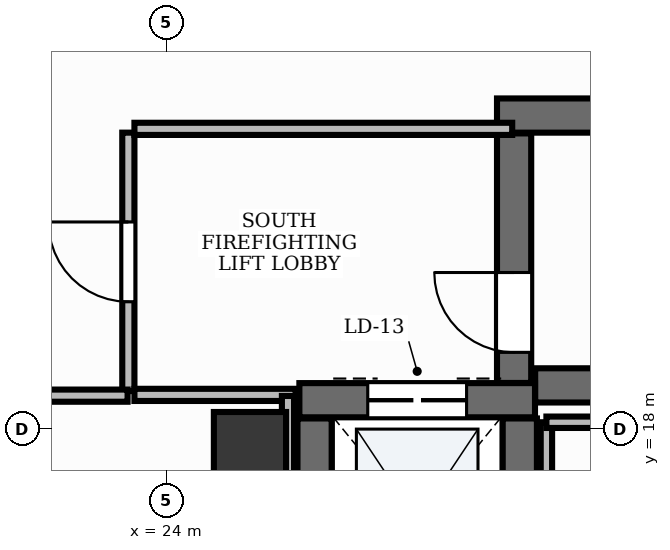
"""IFC4 building model, lengths in metres.
Left out: names, types, materials, properties, quantities, classifications, styles, units other than length and angle.
Written with IfcOpenShell. Run it as: python <this file> out.ifc"""

import sys

from ifc_helpers import new_model, si_unit, direction, frame, frame_2d, origin, origin_2d, place, context, subcontext, project, spatial, rectangle, extrude, element, fill, save


model = new_model("IFC4")
c1 = context("Model", 3, precision=1e-05, world=origin(), true_north=direction((0.0, 1.0)))
c2 = subcontext(c1, "Body", "Model", "MODEL_VIEW")
j1 = project(units=[si_unit("LENGTHUNIT", "METRE"), si_unit("PLANEANGLEUNIT", "RADIAN")], contexts=[c1])
p1 = place(None, origin())
s1 = spatial("IfcSite", under=j1, at=p1, CompositionType="ELEMENT")
p2 = place(p1, origin())
s2 = spatial("IfcBuilding", under=s1, at=p2, CompositionType="ELEMENT")
p3 = place(p2, frame((0.0, 0.0, 67.8)))
s3 = spatial("IfcBuildingStorey", under=s2, at=p3, CompositionType="ELEMENT", Elevation=67.8)
p4 = place(p3, frame((28.852, 18.575, 0.0), z_axis=(0.0, 0.0, 1.0), x_axis=(1.0, 0.0, 0.0)))
e1 = element("IfcWall", 1, at=p4, inside=s3, PredefinedType="SHEAR", context=c2, shape_type="SweptSolid", body=[
    extrude(rectangle(XDim=8.248, YDim=0.45, at=frame_2d((4.124, 0.0))), origin(), (0.0, 0.0, 1.0), 3.9),
])
p5 = place(p3, frame((28.35, 22.125, 0.0), z_axis=(0.0, 0.0, 1.0), x_axis=(1.0, 0.0, 0.0)))
e2 = element("IfcWall", 2, at=p5, inside=s3, PredefinedType="SHEAR", context=c2, shape_type="SweptSolid", body=[
    extrude(rectangle(XDim=8.75, YDim=0.45, at=frame_2d((4.375, 0.0))), origin(), (0.0, 0.0, 1.0), 3.9),
])
p6 = place(p3, frame((28.575, 18.607, 0.0), z_axis=(0.0, 0.0, 1.0), x_axis=(0.0, 1.0, 0.0)))
e3 = element("IfcWall", 3, at=p6, inside=s3, PredefinedType="SHEAR", context=c2, shape_type="SweptSolid", body=[
    extrude(rectangle(XDim=3.283, YDim=0.45, at=frame_2d((1.642, 0.0))), origin(), (0.0, 0.0, 1.0), 3.9),
])
p7 = place(p6, frame((0.403, 0.0, 0.0)))
e4 = element("IfcOpeningElement", 4, at=p7, cuts=e3, PredefinedType="OPENING", context=c2, shape_type="SweptSolid", body=[
    extrude(rectangle(XDim=1.05, YDim=2.15, at=frame_2d((0.525, 1.075))), frame((0.0, 0.24, 0.0), z_axis=(0.0, -1.0, 0.0), x_axis=(1.0, 0.0, 0.0)), (0.0, 0.0, 1.0), 0.48),
])
p8 = place(p3, frame((25.75, 18.38, 0.0), z_axis=(0.0, 0.0, 1.0), x_axis=(1.0, 0.0, 0.0)))
e5 = element("IfcWall", 5, at=p8, inside=s3, PredefinedType="SHEAR", context=c2, shape_type="SweptSolid", body=[
    extrude(rectangle(XDim=3.1, YDim=0.45, at=frame_2d((1.55, 0.0))), origin(), (0.0, 0.0, 1.0), 3.9),
])
p9 = place(p8, frame((0.9, 0.0, 0.0)))
e6 = element("IfcOpeningElement", 6, at=p9, cuts=e5, PredefinedType="OPENING", context=c2, shape_type="SweptSolid", body=[
    extrude(rectangle(XDim=1.3, YDim=2.2, at=frame_2d((0.65, 1.1))), frame((0.0, 0.24, 0.0), z_axis=(0.0, -1.0, 0.0), x_axis=(1.0, 0.0, 0.0)), (0.0, 0.0, 1.0), 0.48),
])
for number, where, z_axis, x_axis in (
    (7, (25.95, 15.44, 0.0), (0.0, 0.0, 1.0), (0.0, 1.0, 0.0)),
    (8, (28.65, 15.44, 0.0), (0.0, 0.0, 1.0), (0.0, 1.0, 0.0)),
):
    element("IfcWall", number, at=place(p3, frame(where, z_axis=z_axis, x_axis=x_axis)), inside=s3, PredefinedType="SHEAR", context=c2, shape_type="SweptSolid", body=[
        extrude(rectangle(XDim=2.7, YDim=0.45, at=frame_2d((1.35, 0.0))), origin(), (0.0, 0.0, 1.0), 3.9),
    ])
p10 = place(p3, frame((25.1, 17.75, -0.0), z_axis=(0.0, 0.0, 1.0), x_axis=(1.0, 0.0, 0.0)))
e9 = element("IfcColumn", 9, at=p10, inside=s3, PredefinedType="PILASTER", context=c2, shape_type="SweptSolid", body=[
    extrude(rectangle(XDim=0.95, YDim=0.95, at=origin_2d()), origin(), (0.0, 0.0, 1.0), 3.901),
])
p11 = place(p3, frame((23.5, 18.5, 0.0), z_axis=(0.0, 0.0, 1.0), x_axis=(0.0, 1.0, 0.0)))
e10 = element("IfcWall", 10, at=p11, inside=s3, PredefinedType="PARTITIONING", context=c2, shape_type="SweptSolid", body=[
    extrude(rectangle(XDim=3.4, YDim=0.16, at=frame_2d((1.7, 0.0))), origin(), (0.0, 0.0, 1.0), 2.91),
])
p12 = place(p11, frame((1.175, 0.0, 0.0)))
e11 = element("IfcOpeningElement", 11, at=p12, cuts=e10, PredefinedType="OPENING", context=c2, shape_type="SweptSolid", body=[
    extrude(rectangle(XDim=1.05, YDim=2.15, at=frame_2d((0.525, 1.075))), frame((0.0, 0.095, 0.0), z_axis=(0.0, -1.0, 0.0), x_axis=(1.0, 0.0, 0.0)), (0.0, 0.0, 1.0), 0.19),
])
p13 = place(p3, frame((23.58, 21.95, 0.0), z_axis=(0.0, 0.0, 1.0), x_axis=(1.0, 0.0, 0.0)))
e12 = element("IfcWall", 12, at=p13, inside=s3, PredefinedType="PARTITIONING", context=c2, shape_type="SweptSolid", body=[
    extrude(rectangle(XDim=4.97, YDim=0.16, at=frame_2d((2.485, 0.0))), origin(), (0.0, 0.0, 1.0), 2.91),
])
p14 = place(p3, frame((23.58, 18.45, 0.0), z_axis=(0.0, 0.0, 1.0), x_axis=(1.0, 0.0, 0.0)))
e13 = element("IfcWall", 13, at=p14, inside=s3, PredefinedType="PARTITIONING", context=c2, shape_type="SweptSolid", body=[
    extrude(rectangle(XDim=2.12, YDim=0.16, at=frame_2d((1.06, 0.0))), origin(), (0.0, 0.0, 1.0), 2.91),
])
p15 = place(p3, frame((11.59, 18.44, 0.0), z_axis=(0.0, 0.0, 1.0), x_axis=(1.0, 0.0, 0.0)))
e14 = element("IfcWall", 14, at=p15, inside=s3, PredefinedType="PARTITIONING", context=c2, shape_type="SweptSolid", body=[
    extrude(rectangle(XDim=11.9, YDim=0.16, at=frame_2d((5.95, 0.0))), origin(), (0.0, 0.0, 1.0), 2.91),
])
p16 = place(p15, frame((0.24, 0.0, 0.0)))
e15 = element("IfcOpeningElement", 15, at=p16, cuts=e14, PredefinedType="OPENING", context=c2, shape_type="SweptSolid", body=[
    extrude(rectangle(XDim=0.95, YDim=2.15, at=frame_2d((0.475, 1.075))), frame((0.0, 0.095, 0.0), z_axis=(0.0, -1.0, 0.0), x_axis=(1.0, 0.0, 0.0)), (0.0, 0.0, 1.0), 0.19),
])
p17 = place(p3, frame((25.6, 18.436, 0.0), z_axis=(0.0, 0.0, 1.0), x_axis=(0.0, -1.0, 0.0)))
e16 = element("IfcWall", 16, at=p17, inside=s3, PredefinedType="PARTITIONING", context=c2, shape_type="SweptSolid", body=[
    extrude(rectangle(XDim=2.934, YDim=0.16, at=frame_2d((1.467, 0.0))), origin(), (0.0, 0.0, 1.0), 2.91),
])
p18 = place(p3, frame((29.0, 15.502, 0.0), z_axis=(0.0, 0.0, 1.0), x_axis=(0.0, 1.0, 0.0)))
e17 = element("IfcWall", 17, at=p18, inside=s3, PredefinedType="PARTITIONING", context=c2, shape_type="SweptSolid", body=[
    extrude(rectangle(XDim=2.588, YDim=0.15, at=frame_2d((1.294, 0.0))), origin(), (0.0, 0.0, 1.0), 2.91),
])
p19 = place(p3, frame((29.0, 18.09, 0.0), z_axis=(0.0, 0.0, 1.0), x_axis=(1.0, 0.0, 0.0)))
e18 = element("IfcWall", 18, at=p19, inside=s3, PredefinedType="PARTITIONING", context=c2, shape_type="SweptSolid", body=[
    extrude(rectangle(XDim=8.35, YDim=0.15, at=frame_2d((4.175, 0.0))), origin(), (0.0, 0.0, 1.0), 2.91),
])
p20 = place(p7, origin())
e19 = element("IfcDoor", 19, at=p20, inside=s3, OperationType="SINGLE_SWING_RIGHT", PredefinedType="DOOR", context=c2, shape_type="SweptSolid", body=[
    extrude(rectangle(XDim=1.05, YDim=2.15, at=frame_2d((0.525, 1.075))), frame((0.0, 0.025, 0.0), z_axis=(0.0, -1.0, 0.0), x_axis=(1.0, 0.0, 0.0)), (0.0, 0.0, 1.0), 0.05),
])
fill(e4, e19)
p21 = place(p9, origin())
e20 = element("IfcDoor", 20, at=p21, inside=s3, OperationType="DOUBLE_DOOR_SLIDING", PredefinedType="DOOR", context=c2, shape_type="SweptSolid", body=[
    extrude(rectangle(XDim=1.3, YDim=2.2, at=frame_2d((0.65, 1.1))), frame((0.0, 0.025, 0.0), z_axis=(0.0, -1.0, 0.0), x_axis=(1.0, 0.0, 0.0)), (0.0, 0.0, 1.0), 0.05),
])
fill(e6, e20)
p22 = place(p12, origin())
e21 = element("IfcDoor", 21, at=p22, inside=s3, OperationType="SINGLE_SWING_RIGHT", PredefinedType="DOOR", context=c2, shape_type="SweptSolid", body=[
    extrude(rectangle(XDim=1.05, YDim=2.15, at=frame_2d((0.525, 1.075))), frame((0.0, 0.025, 0.0), z_axis=(0.0, -1.0, 0.0), x_axis=(1.0, 0.0, 0.0)), (0.0, 0.0, 1.0), 0.05),
])
fill(e11, e21)
save(model, sys.argv[1])
